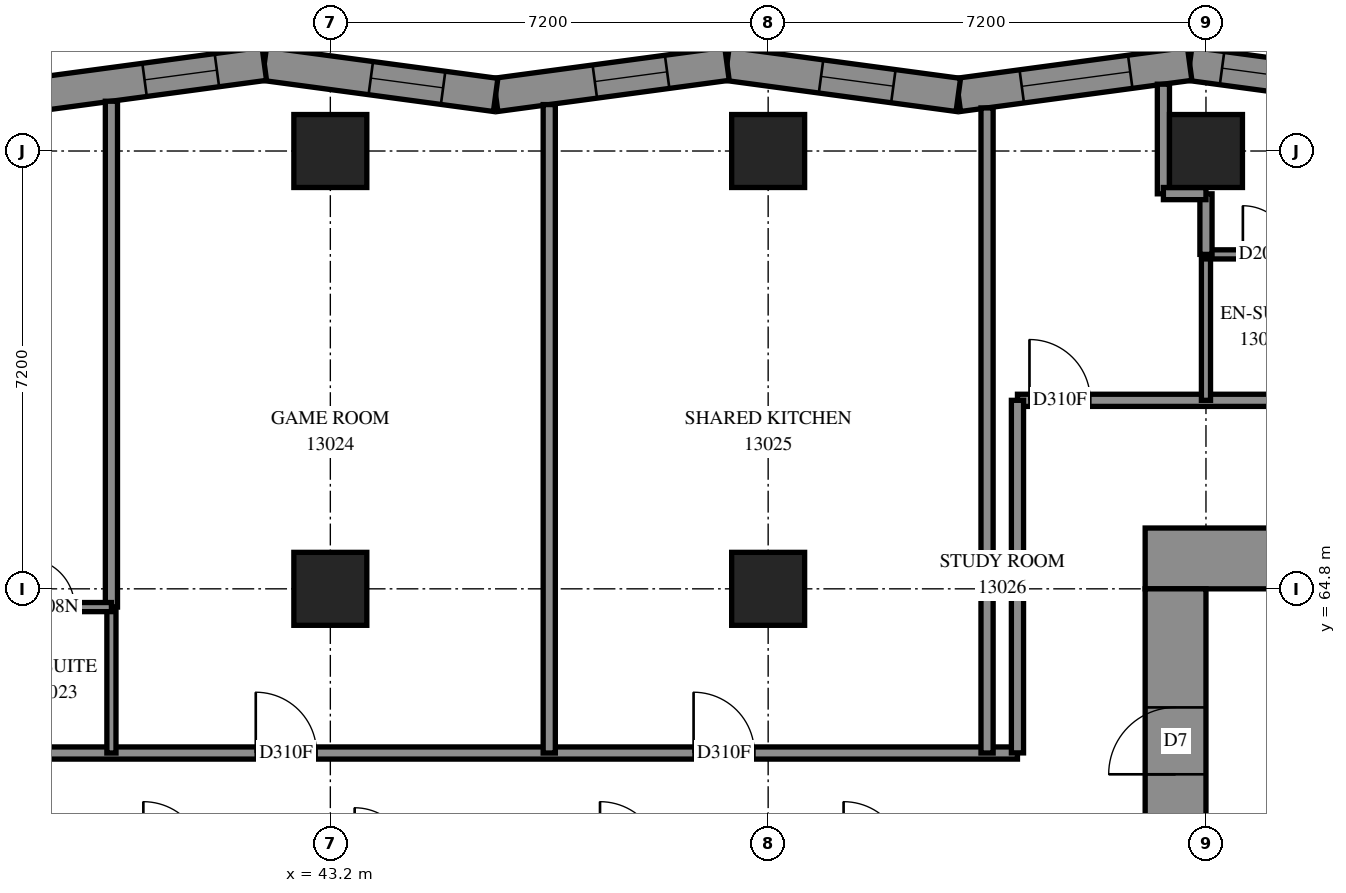
"""IFC4 building model, lengths in metres.
Left out: names, types, materials, properties, quantities, classifications, styles, units other than length and angle.
Written with IfcOpenShell. Run it as: python <this file> out.ifc"""

import sys

from ifc_helpers import new_model, si_unit, direction, frame, frame_2d, origin, origin_2d, place, context, subcontext, project, spatial, polyline, rectangle, outline, extrude, element, fill, save


model = new_model("IFC4")
c1 = context("Model", 3, precision=1e-05, world=origin(), true_north=direction((0.0, 1.0)))
c2 = subcontext(c1, "Body", "Model", "MODEL_VIEW")
j1 = project(units=[si_unit("LENGTHUNIT", "METRE"), si_unit("PLANEANGLEUNIT", "RADIAN")], contexts=[c1])
p1 = place(None, origin())
s1 = spatial("IfcSite", under=j1, at=p1, CompositionType="ELEMENT")
p2 = place(p1, origin())
s2 = spatial("IfcBuilding", under=s1, at=p2, CompositionType="ELEMENT")
p3 = place(p2, frame((0.0, 0.0, 50.8)))
s3 = spatial("IfcBuildingStorey", under=s2, at=p3, CompositionType="ELEMENT", Elevation=50.8)
for number, where, z_axis, x_axis in (
    (1, (43.2, 64.8, 0.0), (0.0, 0.0, 1.0), (1.0, 0.0, 0.0)),
    (2, (43.2, 72.0, 0.0), (0.0, 0.0, 1.0), (1.0, 0.0, 0.0)),
    (3, (50.4, 64.8, 0.0), (0.0, 0.0, 1.0), (1.0, 0.0, 0.0)),
    (4, (50.4, 72.0, 0.0), (0.0, 0.0, 1.0), (1.0, 0.0, 0.0)),
    (5, (57.6, 72.0, 0.0), (0.0, 0.0, 1.0), (1.0, 0.0, 0.0)),
):
    element("IfcColumn", number, at=place(p3, frame(where, z_axis=z_axis, x_axis=x_axis)), inside=s3, PredefinedType="COLUMN", context=c2, shape_type="SweptSolid", body=[
        extrude(rectangle(XDim=1.2, YDim=1.2, at=origin_2d()), origin(), (0.0, 0.0, 1.0), 3.1),
    ])
p4 = place(p3, frame((56.6, 65.3, -0.3), z_axis=(0.0, 0.0, 1.0), x_axis=(1.0, 0.0, 0.0)))
e6 = element("IfcWall", 6, at=p4, inside=s3, PredefinedType="SHEAR", context=c2, shape_type="SweptSolid", body=[
    extrude(rectangle(XDim=16.4, YDim=1.0, at=frame_2d((8.2, 0.0))), origin(), (0.0, 0.0, 1.0), 2.7),
])
p5 = place(p4, frame((11.0, 0.0, 0.3)))
e7 = element("IfcOpeningElement", 7, at=p5, cuts=e6, PredefinedType="OPENING", context=c2, shape_type="SweptSolid", body=[
    extrude(rectangle(XDim=0.8, YDim=2.1, at=frame_2d((0.4, 1.05))), frame((0.0, 0.51, 0.0), z_axis=(0.0, -1.0, 0.0), x_axis=(1.0, 0.0, 0.0)), (0.0, 0.0, 1.0), 1.02),
])
p6 = place(p3, frame((57.1, 50.4, -0.3), z_axis=(0.0, 0.0, 1.0), x_axis=(0.0, 1.0, 0.0)))
e8 = element("IfcWall", 8, at=p6, inside=s3, PredefinedType="SHEAR", context=c2, shape_type="SweptSolid", body=[
    extrude(rectangle(XDim=14.4, YDim=1.0, at=frame_2d((7.2, 0.0))), origin(), (0.0, 0.0, 1.0), 2.7),
])
p7 = place(p6, frame((4.55, 0.0, 0.3)))
e9 = element("IfcOpeningElement", 9, at=p7, cuts=e8, PredefinedType="OPENING", context=c2, shape_type="SweptSolid", body=[
    extrude(rectangle(XDim=1.1, YDim=2.1, at=frame_2d((0.55, 1.05))), frame((0.0, 0.51, 0.0), z_axis=(0.0, -1.0, 0.0), x_axis=(1.0, 0.0, 0.0)), (0.0, 0.0, 1.0), 1.02),
])
p8 = place(p6, frame((11.35, 0.0, 0.3)))
e10 = element("IfcOpeningElement", 10, at=p8, cuts=e8, PredefinedType="OPENING", context=c2, shape_type="SweptSolid", body=[
    extrude(rectangle(XDim=1.1, YDim=2.1, at=frame_2d((0.55, 1.05))), frame((0.0, 0.51, 0.0), z_axis=(0.0, -1.0, 0.0), x_axis=(1.0, 0.0, 0.0)), (0.0, 0.0, 1.0), 1.02),
])
p9 = place(p3, frame((61.136, 72.922, 0.0), z_axis=(0.0, 0.0, 1.0), x_axis=(-0.9910647018, 0.133381996, 0.0)))
e11 = element("IfcWall", 11, at=p9, inside=s3, PredefinedType="SOLIDWALL", context=c2, shape_type="SweptSolid", body=[
    extrude(outline(polyline([(0.037, -0.275), (3.876, -0.275), (3.802, 0.275), (-0.037, 0.275), (0.037, -0.275)])), origin(), (0.0, 0.0, 1.0), 3.1),
])
p10 = place(p9, frame((0.501, 0.0, 0.5)))
e12 = element("IfcOpeningElement", 12, at=p10, cuts=e11, PredefinedType="OPENING", context=c2, shape_type="SweptSolid", body=[
    extrude(rectangle(XDim=2.8, YDim=2.45, at=frame_2d((1.4, 1.225))), frame((0.0, 0.285, 0.0), z_axis=(0.0, -1.0, 0.0), x_axis=(1.0, 0.0, 0.0)), (0.0, 0.0, 1.0), 0.57),
])
p11 = place(p3, frame((57.332, 73.434, 0.0), z_axis=(0.0, 0.0, 1.0), x_axis=(-0.9910651652, -0.1333785524, 0.0)))
e13 = element("IfcWall", 13, at=p11, inside=s3, PredefinedType="SOLIDWALL", context=c2, shape_type="SweptSolid", body=[
    extrude(outline(polyline([(-0.037, -0.275), (3.802, -0.275), (3.876, 0.275), (0.037, 0.275), (-0.037, -0.275)])), origin(), (0.0, 0.0, 1.0), 3.1),
])
p12 = place(p11, frame((0.986, 0.0, 0.7)))
e14 = element("IfcOpeningElement", 14, at=p12, cuts=e13, PredefinedType="OPENING", context=c2, shape_type="SweptSolid", body=[
    extrude(rectangle(XDim=1.8, YDim=2.2, at=frame_2d((0.9, 1.1))), frame((0.0, 0.285, 0.0), z_axis=(0.0, -1.0, 0.0), x_axis=(1.0, 0.0, 0.0)), (0.0, 0.0, 1.0), 0.57),
])
p13 = place(p3, frame((53.527, 72.922, 0.0), z_axis=(0.0, 0.0, 1.0), x_axis=(-0.9910647018, 0.133381996, 0.0)))
e15 = element("IfcWall", 15, at=p13, inside=s3, PredefinedType="SOLIDWALL", context=c2, shape_type="SweptSolid", body=[
    extrude(outline(polyline([(0.037, -0.275), (3.876, -0.275), (3.802, 0.275), (-0.037, 0.275), (0.037, -0.275)])), origin(), (0.0, 0.0, 1.0), 3.1),
])
p14 = place(p13, frame((1.078, 0.0, 0.5)))
e16 = element("IfcOpeningElement", 16, at=p14, cuts=e15, PredefinedType="OPENING", context=c2, shape_type="SweptSolid", body=[
    extrude(rectangle(XDim=1.2, YDim=2.45, at=frame_2d((0.6, 1.225))), frame((0.0, 0.285, 0.0), z_axis=(0.0, -1.0, 0.0), x_axis=(1.0, 0.0, 0.0)), (0.0, 0.0, 1.0), 0.57),
])
p15 = place(p3, frame((49.723, 73.434, 0.0), z_axis=(0.0, 0.0, 1.0), x_axis=(-0.9910651652, -0.1333785524, 0.0)))
e17 = element("IfcWall", 17, at=p15, inside=s3, PredefinedType="SOLIDWALL", context=c2, shape_type="SweptSolid", body=[
    extrude(outline(polyline([(-0.037, -0.275), (3.802, -0.275), (3.876, 0.275), (0.037, 0.275), (-0.037, -0.275)])), origin(), (0.0, 0.0, 1.0), 3.1),
])
p16 = place(p15, frame((0.993, 0.0, 0.5)))
e18 = element("IfcOpeningElement", 18, at=p16, cuts=e17, PredefinedType="OPENING", context=c2, shape_type="SweptSolid", body=[
    extrude(rectangle(XDim=1.2, YDim=2.45, at=frame_2d((0.6, 1.225))), frame((0.0, 0.285, 0.0), z_axis=(0.0, -1.0, 0.0), x_axis=(1.0, 0.0, 0.0)), (0.0, 0.0, 1.0), 0.57),
])
p17 = place(p3, frame((45.919, 72.922, 0.0), z_axis=(0.0, 0.0, 1.0), x_axis=(-0.9910651652, 0.1333785524, 0.0)))
e19 = element("IfcWall", 19, at=p17, inside=s3, PredefinedType="SOLIDWALL", context=c2, shape_type="SweptSolid", body=[
    extrude(outline(polyline([(0.037, -0.275), (3.876, -0.275), (3.802, 0.275), (-0.037, 0.275), (0.037, -0.275)])), origin(), (0.0, 0.0, 1.0), 3.1),
])
p18 = place(p17, frame((0.872, 0.0, 0.5)))
e20 = element("IfcOpeningElement", 20, at=p18, cuts=e19, PredefinedType="OPENING", context=c2, shape_type="SweptSolid", body=[
    extrude(rectangle(XDim=1.2, YDim=2.45, at=frame_2d((0.6, 1.225))), frame((0.0, 0.285, 0.0), z_axis=(0.0, -1.0, 0.0), x_axis=(1.0, 0.0, 0.0)), (0.0, 0.0, 1.0), 0.57),
])
p19 = place(p3, frame((42.114, 73.434, 0.0), z_axis=(0.0, 0.0, 1.0), x_axis=(-0.9910647018, -0.133381996, 0.0)))
e21 = element("IfcWall", 21, at=p19, inside=s3, PredefinedType="SOLIDWALL", context=c2, shape_type="SweptSolid", body=[
    extrude(outline(polyline([(-0.037, -0.275), (3.802, -0.275), (3.876, 0.275), (0.037, 0.275), (-0.037, -0.275)])), origin(), (0.0, 0.0, 1.0), 3.1),
])
p20 = place(p19, frame((0.787, 0.0, 0.5)))
e22 = element("IfcOpeningElement", 22, at=p20, cuts=e21, PredefinedType="OPENING", context=c2, shape_type="SweptSolid", body=[
    extrude(rectangle(XDim=1.2, YDim=2.45, at=frame_2d((0.6, 1.225))), frame((0.0, 0.285, 0.0), z_axis=(0.0, -1.0, 0.0), x_axis=(1.0, 0.0, 0.0)), (0.0, 0.0, 1.0), 0.57),
])
p21 = place(p3, frame((33.3, 62.1, 0.0), z_axis=(0.0, 0.0, 1.0), x_axis=(1.0, 0.0, 0.0)))
e23 = element("IfcWall", 23, at=p21, inside=s3, PredefinedType="PARTITIONING", context=c2, shape_type="SweptSolid", body=[
    extrude(rectangle(XDim=21.2, YDim=0.2, at=frame_2d((10.6, 0.0))), origin(), (0.0, 0.0, 1.0), 3.1),
])
p22 = place(p21, frame((1.395, 0.0, 0.0)))
e24 = element("IfcOpeningElement", 24, at=p22, cuts=e23, PredefinedType="OPENING", context=c2, shape_type="SweptSolid", body=[
    extrude(rectangle(XDim=0.9, YDim=2.1, at=frame_2d((0.45, 1.05))), frame((0.0, 0.11, 0.0), z_axis=(0.0, -1.0, 0.0), x_axis=(1.0, 0.0, 0.0)), (0.0, 0.0, 1.0), 0.22),
])
p23 = place(p21, frame((8.674, 0.0, 0.0)))
e25 = element("IfcOpeningElement", 25, at=p23, cuts=e23, PredefinedType="OPENING", context=c2, shape_type="SweptSolid", body=[
    extrude(rectangle(XDim=1.0, YDim=2.1, at=frame_2d((0.5, 1.05))), frame((0.0, 0.11, 0.0), z_axis=(0.0, -1.0, 0.0), x_axis=(1.0, 0.0, 0.0)), (0.0, 0.0, 1.0), 0.22),
])
p24 = place(p21, frame((15.874, 0.0, 0.0)))
e26 = element("IfcOpeningElement", 26, at=p24, cuts=e23, PredefinedType="OPENING", context=c2, shape_type="SweptSolid", body=[
    extrude(rectangle(XDim=1.0, YDim=2.1, at=frame_2d((0.5, 1.05))), frame((0.0, 0.11, 0.0), z_axis=(0.0, -1.0, 0.0), x_axis=(1.0, 0.0, 0.0)), (0.0, 0.0, 1.0), 0.22),
])
p25 = place(p3, frame((54.5, 67.9, 0.0), z_axis=(0.0, 0.0, 1.0), x_axis=(1.0, 0.0, 0.0)))
e27 = element("IfcWall", 27, at=p25, inside=s3, PredefinedType="PARTITIONING", context=c2, shape_type="SweptSolid", body=[
    extrude(rectangle(XDim=20.6, YDim=0.2, at=frame_2d((10.3, 0.0))), origin(), (0.0, 0.0, 1.0), 3.1),
])
p26 = place(p25, frame((0.198, 0.0, 0.0)))
e28 = element("IfcOpeningElement", 28, at=p26, cuts=e27, PredefinedType="OPENING", context=c2, shape_type="SweptSolid", body=[
    extrude(rectangle(XDim=1.0, YDim=2.1, at=frame_2d((0.5, 1.05))), frame((0.0, 0.11, 0.0), z_axis=(0.0, -1.0, 0.0), x_axis=(1.0, 0.0, 0.0)), (0.0, 0.0, 1.0), 0.22),
])
p27 = place(p25, frame((19.358, 0.0, 0.0)))
e29 = element("IfcOpeningElement", 29, at=p27, cuts=e27, PredefinedType="OPENING", context=c2, shape_type="SweptSolid", body=[
    extrude(rectangle(XDim=1.0, YDim=2.1, at=frame_2d((0.5, 1.05))), frame((0.0, 0.11, 0.0), z_axis=(0.0, -1.0, 0.0), x_axis=(1.0, 0.0, 0.0)), (0.0, 0.0, 1.0), 0.22),
])
p28 = place(p25, frame((6.698, 0.0, 0.0)))
e30 = element("IfcOpeningElement", 30, at=p28, cuts=e27, PredefinedType="OPENING", context=c2, shape_type="SweptSolid", body=[
    extrude(rectangle(XDim=0.9, YDim=2.1, at=frame_2d((0.45, 1.05))), frame((0.0, 0.11, 0.0), z_axis=(0.0, -1.0, 0.0), x_axis=(1.0, 0.0, 0.0)), (0.0, 0.0, 1.0), 0.22),
])
p29 = place(p25, frame((13.884, 0.0, 0.0)))
e31 = element("IfcOpeningElement", 31, at=p29, cuts=e27, PredefinedType="OPENING", context=c2, shape_type="SweptSolid", body=[
    extrude(rectangle(XDim=1.0, YDim=2.1, at=frame_2d((0.5, 1.05))), frame((0.0, 0.11, 0.0), z_axis=(0.0, -1.0, 0.0), x_axis=(1.0, 0.0, 0.0)), (0.0, 0.0, 1.0), 0.22),
])
p30 = place(p3, frame((46.8, 62.1, 0.0), z_axis=(0.0, 0.0, 1.0), x_axis=(0.0, 1.0, 0.0)))
e32 = element("IfcWall", 32, at=p30, inside=s3, PredefinedType="PARTITIONING", context=c2, shape_type="SweptSolid", body=[
    extrude(rectangle(XDim=10.664, YDim=0.2, at=frame_2d((5.332, 0.0))), origin(), (0.0, 0.0, 1.0), 3.1),
])
p31 = place(p3, frame((54.0, 62.1, 0.0), z_axis=(0.0, 0.0, 1.0), x_axis=(0.0, 1.0, 0.0)))
e33 = element("IfcWall", 33, at=p31, inside=s3, PredefinedType="PARTITIONING", context=c2, shape_type="SweptSolid", body=[
    extrude(rectangle(XDim=10.609, YDim=0.2, at=frame_2d((5.304, 0.0))), origin(), (0.0, 0.0, 1.0), 3.1),
])
p32 = place(p3, frame((39.6, 64.5, 0.0), z_axis=(0.0, 0.0, 1.0), x_axis=(0.0, 1.0, 0.0)))
e34 = element("IfcWall", 34, at=p32, inside=s3, PredefinedType="PARTITIONING", context=c2, shape_type="SweptSolid", body=[
    extrude(rectangle(XDim=8.319, YDim=0.2, at=frame_2d((4.159, 0.0))), origin(), (0.0, 0.0, 1.0), 3.1),
])
p33 = place(p3, frame((54.5, 62.102, 0.0), z_axis=(0.0, 0.0, 1.0), x_axis=(0.0, 1.0, 0.0)))
e35 = element("IfcWall", 35, at=p33, inside=s3, PredefinedType="PARTITIONING", context=c2, shape_type="SweptSolid", body=[
    extrude(rectangle(XDim=5.798, YDim=0.2, at=frame_2d((2.899, 0.0))), origin(), (0.0, 0.0, 1.0), 3.1),
])
for number, where, z_axis, x_axis in (
    (36, (39.6, 62.1, 0.0), (0.0, 0.0, 1.0), (0.0, 1.0, 0.0)),
    (37, (57.6, 67.9, 0.0), (0.0, 0.0, 1.0), (0.0, 1.0, 0.0)),
):
    element("IfcWall", number, at=place(p3, frame(where, z_axis=z_axis, x_axis=x_axis)), inside=s3, PredefinedType="PARTITIONING", context=c2, shape_type="SweptSolid", body=[
        extrude(rectangle(XDim=2.4, YDim=0.15, at=frame_2d((1.2, 0.0))), origin(), (0.0, 0.0, 1.0), 3.1),
    ])
p34 = place(p3, frame((37.7, 64.5, 0.0), z_axis=(0.0, 0.0, 1.0), x_axis=(1.0, 0.0, 0.0)))
e38 = element("IfcWall", 38, at=p34, inside=s3, PredefinedType="PARTITIONING", context=c2, shape_type="SweptSolid", body=[
    extrude(rectangle(XDim=1.9, YDim=0.15, at=frame_2d((0.95, 0.0))), origin(), (0.0, 0.0, 1.0), 3.1),
])
p35 = place(p34, frame((0.493, 0.0, 0.0)))
e39 = element("IfcOpeningElement", 39, at=p35, cuts=e38, PredefinedType="OPENING", context=c2, shape_type="SweptSolid", body=[
    extrude(rectangle(XDim=0.8, YDim=2.1, at=frame_2d((0.4, 1.05))), frame((0.0, 0.085, 0.0), z_axis=(0.0, -1.0, 0.0), x_axis=(1.0, 0.0, 0.0)), (0.0, 0.0, 1.0), 0.17),
])
p36 = place(p3, frame((57.6, 70.3, 0.0), z_axis=(0.0, 0.0, 1.0), x_axis=(1.0, 0.0, 0.0)))
e40 = element("IfcWall", 40, at=p36, inside=s3, PredefinedType="PARTITIONING", context=c2, shape_type="SweptSolid", body=[
    extrude(rectangle(XDim=1.9, YDim=0.15, at=frame_2d((0.95, 0.0))), origin(), (0.0, 0.0, 1.0), 3.1),
])
p37 = place(p36, frame((0.607, 0.0, 0.0)))
e41 = element("IfcOpeningElement", 41, at=p37, cuts=e40, PredefinedType="OPENING", context=c2, shape_type="SweptSolid", body=[
    extrude(rectangle(XDim=0.8, YDim=2.1, at=frame_2d((0.4, 1.05))), frame((0.0, 0.085, 0.0), z_axis=(0.0, -1.0, 0.0), x_axis=(1.0, 0.0, 0.0)), (0.0, 0.0, 1.0), 0.17),
])
p38 = place(p3, frame((56.9, 71.296, 0.0), z_axis=(0.0, 0.0, 1.0), x_axis=(0.0, 1.0, 0.0)))
e42 = element("IfcWall", 42, at=p38, inside=s3, PredefinedType="PARTITIONING", context=c2, shape_type="SweptSolid", body=[
    extrude(rectangle(XDim=1.803, YDim=0.2, at=frame_2d((0.901, 0.0))), origin(), (0.0, 0.0, 1.0), 3.1),
])
p39 = place(p3, frame((57.6, 70.3, 0.0), z_axis=(0.0, 0.0, 1.0), x_axis=(0.0, 1.0, 0.0)))
e43 = element("IfcWall", 43, at=p39, inside=s3, PredefinedType="PARTITIONING", context=c2, shape_type="SweptSolid", body=[
    extrude(rectangle(XDim=0.996, YDim=0.2, at=frame_2d((0.498, 0.0))), origin(), (0.0, 0.0, 1.0), 3.1),
])
p40 = place(p3, frame((56.9, 71.3, 0.0), z_axis=(0.0, 0.0, 1.0), x_axis=(1.0, 0.0, 0.0)))
e44 = element("IfcWall", 44, at=p40, inside=s3, PredefinedType="PARTITIONING", context=c2, shape_type="SweptSolid", body=[
    extrude(rectangle(XDim=0.7, YDim=0.2, at=frame_2d((0.35, 0.0))), origin(), (0.0, 0.0, 1.0), 3.1),
])
p41 = place(p10, origin())
e45 = element("IfcWindow", 45, at=p41, inside=s3, PartitioningType="SINGLE_PANEL", PredefinedType="WINDOW", context=c2, shape_type="SweptSolid", body=[
    extrude(rectangle(XDim=2.8, YDim=2.45, at=frame_2d((1.4, 1.225))), frame((0.0, 0.155, 0.0), z_axis=(0.0, -1.0, 0.0), x_axis=(1.0, 0.0, 0.0)), (0.0, 0.0, 1.0), 0.06),
])
fill(e12, e45)
p42 = place(p14, origin())
e46 = element("IfcWindow", 46, at=p42, inside=s3, PartitioningType="SINGLE_PANEL", PredefinedType="WINDOW", context=c2, shape_type="SweptSolid", body=[
    extrude(rectangle(XDim=1.2, YDim=2.45, at=frame_2d((0.6, 1.225))), frame((0.0, 0.155, 0.0), z_axis=(0.0, -1.0, 0.0), x_axis=(1.0, 0.0, 0.0)), (0.0, 0.0, 1.0), 0.06),
])
fill(e16, e46)
p43 = place(p16, origin())
e47 = element("IfcWindow", 47, at=p43, inside=s3, PartitioningType="SINGLE_PANEL", PredefinedType="WINDOW", context=c2, shape_type="SweptSolid", body=[
    extrude(rectangle(XDim=1.2, YDim=2.45, at=frame_2d((0.6, 1.225))), frame((0.0, 0.155, 0.0), z_axis=(0.0, -1.0, 0.0), x_axis=(1.0, 0.0, 0.0)), (0.0, 0.0, 1.0), 0.06),
])
fill(e18, e47)
p44 = place(p18, origin())
e48 = element("IfcWindow", 48, at=p44, inside=s3, PartitioningType="SINGLE_PANEL", PredefinedType="WINDOW", context=c2, shape_type="SweptSolid", body=[
    extrude(rectangle(XDim=1.2, YDim=2.45, at=frame_2d((0.6, 1.225))), frame((0.0, 0.155, 0.0), z_axis=(0.0, -1.0, 0.0), x_axis=(1.0, 0.0, 0.0)), (0.0, 0.0, 1.0), 0.06),
])
fill(e20, e48)
p45 = place(p20, origin())
e49 = element("IfcWindow", 49, at=p45, inside=s3, PartitioningType="SINGLE_PANEL", PredefinedType="WINDOW", context=c2, shape_type="SweptSolid", body=[
    extrude(rectangle(XDim=1.2, YDim=2.45, at=frame_2d((0.6, 1.225))), frame((0.0, 0.155, 0.0), z_axis=(0.0, -1.0, 0.0), x_axis=(1.0, 0.0, 0.0)), (0.0, 0.0, 1.0), 0.06),
])
fill(e22, e49)
p46 = place(p8, origin())
e50 = element("IfcDoor", 50, at=p46, inside=s3, OperationType="SINGLE_SWING_LEFT", PredefinedType="DOOR", context=c2, shape_type="SweptSolid", body=[
    extrude(rectangle(XDim=1.1, YDim=2.1, at=frame_2d((0.55, 1.05))), frame((0.0, 0.025, 0.0), z_axis=(0.0, -1.0, 0.0), x_axis=(1.0, 0.0, 0.0)), (0.0, 0.0, 1.0), 0.05),
])
fill(e10, e50)
p47 = place(p35, origin())
e51 = element("IfcDoor", 51, at=p47, inside=s3, OperationType="SINGLE_SWING_RIGHT", PredefinedType="DOOR", context=c2, shape_type="SweptSolid", body=[
    extrude(rectangle(XDim=0.8, YDim=2.1, at=frame_2d((0.4, 1.05))), frame((0.0, 0.025, 0.0), z_axis=(0.0, -1.0, 0.0), x_axis=(1.0, 0.0, 0.0)), (0.0, 0.0, 1.0), 0.05),
])
fill(e39, e51)
p48 = place(p23, origin())
e52 = element("IfcDoor", 52, at=p48, inside=s3, OperationType="SINGLE_SWING_LEFT", PredefinedType="DOOR", context=c2, shape_type="SweptSolid", body=[
    extrude(rectangle(XDim=1.0, YDim=2.1, at=frame_2d((0.5, 1.05))), frame((0.0, 0.025, 0.0), z_axis=(0.0, -1.0, 0.0), x_axis=(1.0, 0.0, 0.0)), (0.0, 0.0, 1.0), 0.05),
])
fill(e25, e52)
p49 = place(p24, origin())
e53 = element("IfcDoor", 53, at=p49, inside=s3, OperationType="SINGLE_SWING_LEFT", PredefinedType="DOOR", context=c2, shape_type="SweptSolid", body=[
    extrude(rectangle(XDim=1.0, YDim=2.1, at=frame_2d((0.5, 1.05))), frame((0.0, 0.025, 0.0), z_axis=(0.0, -1.0, 0.0), x_axis=(1.0, 0.0, 0.0)), (0.0, 0.0, 1.0), 0.05),
])
fill(e26, e53)
p50 = place(p26, origin())
e54 = element("IfcDoor", 54, at=p50, inside=s3, OperationType="SINGLE_SWING_LEFT", PredefinedType="DOOR", context=c2, shape_type="SweptSolid", body=[
    extrude(rectangle(XDim=1.0, YDim=2.1, at=frame_2d((0.5, 1.05))), frame((0.0, 0.025, 0.0), z_axis=(0.0, -1.0, 0.0), x_axis=(1.0, 0.0, 0.0)), (0.0, 0.0, 1.0), 0.05),
])
fill(e28, e54)
p51 = place(p37, origin())
e55 = element("IfcDoor", 55, at=p51, inside=s3, OperationType="SINGLE_SWING_RIGHT", PredefinedType="DOOR", context=c2, shape_type="SweptSolid", body=[
    extrude(rectangle(XDim=0.8, YDim=2.1, at=frame_2d((0.4, 1.05))), frame((0.0, 0.025, 0.0), z_axis=(0.0, -1.0, 0.0), x_axis=(1.0, 0.0, 0.0)), (0.0, 0.0, 1.0), 0.05),
])
fill(e41, e55)
p52 = place(p12, origin())
e56 = element("IfcWindow", 56, at=p52, inside=s3, PartitioningType="SINGLE_PANEL", PredefinedType="WINDOW", context=c2, shape_type="SweptSolid", body=[
    extrude(rectangle(XDim=1.8, YDim=2.2, at=frame_2d((0.9, 1.1))), frame((0.0, 0.155, 0.0), z_axis=(0.0, -1.0, 0.0), x_axis=(1.0, 0.0, 0.0)), (0.0, 0.0, 1.0), 0.06),
])
fill(e14, e56)
save(model, sys.argv[1])
